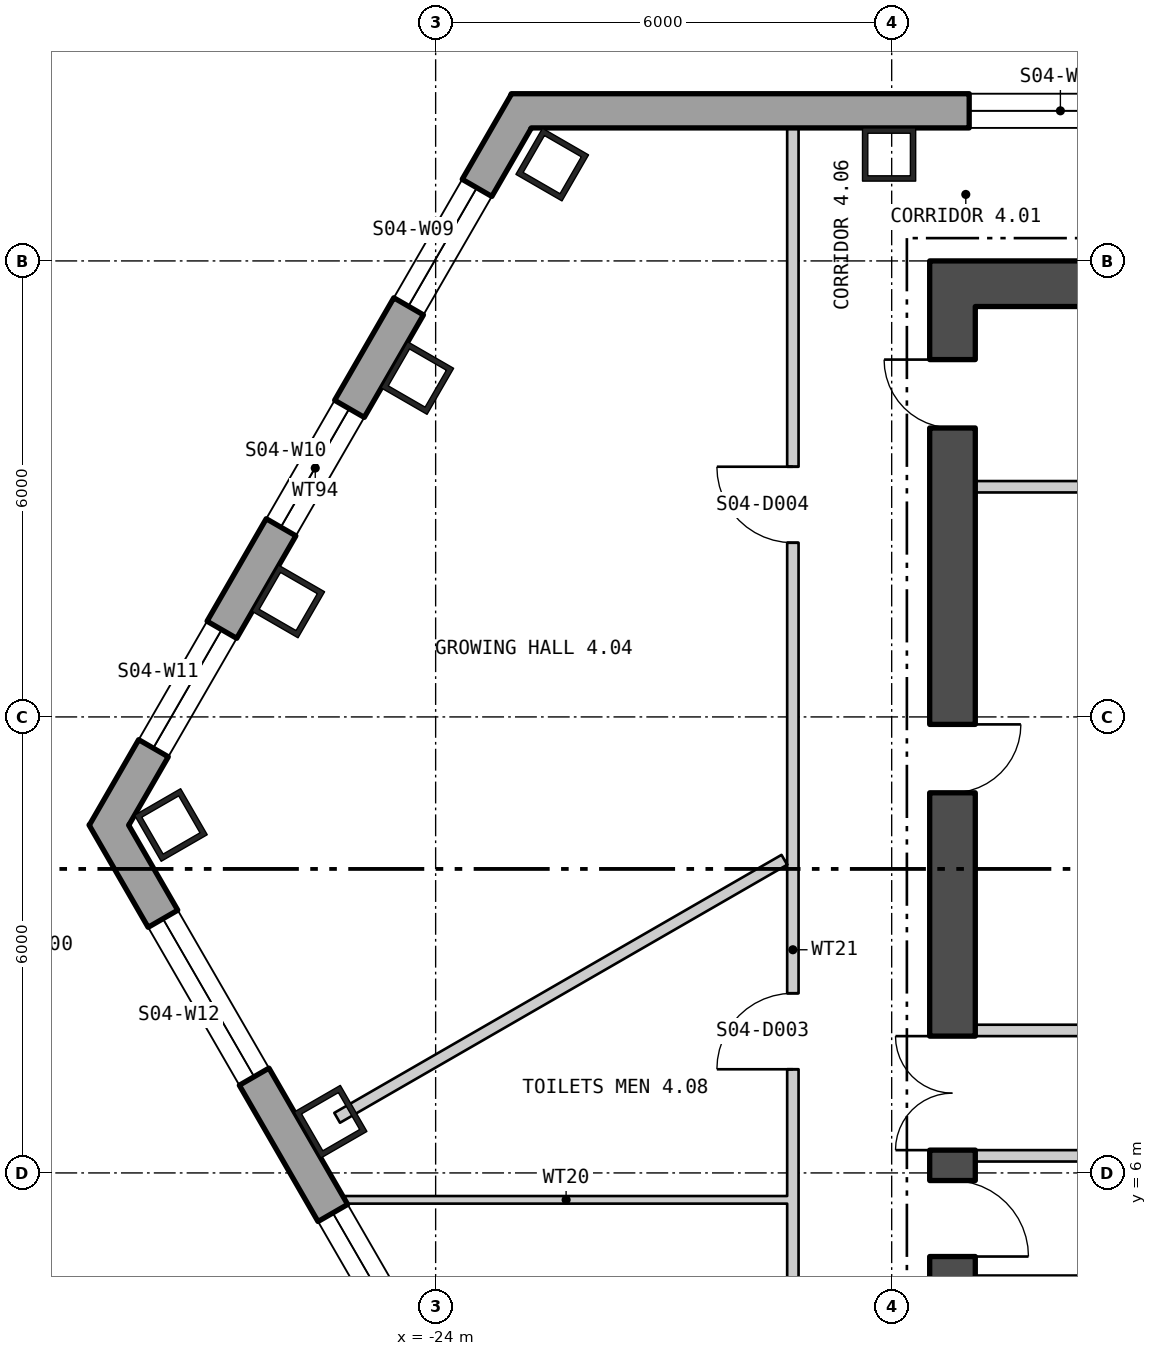
"""IFC4 building model, lengths in metres.
Left out: names, types, materials, properties, quantities, classifications, styles, units other than length and angle.
Written with IfcOpenShell. Run it as: python <this file> out.ifc"""

import sys

from ifc_helpers import new_model, si_unit, direction, frame, frame_2d, origin, origin_2d, place, context, subcontext, project, spatial, polyline, rectangle, hollow_rectangle, outline, extrude, element, fill, save


model = new_model("IFC4")
c1 = context("Model", 3, precision=1e-05, world=origin(), true_north=direction((0.0, 1.0)))
c2 = subcontext(c1, "Body", "Model", "MODEL_VIEW")
j1 = project(units=[si_unit("LENGTHUNIT", "METRE"), si_unit("PLANEANGLEUNIT", "RADIAN")], contexts=[c1])
p1 = place(None, origin())
s1 = spatial("IfcSite", under=j1, at=p1, CompositionType="ELEMENT")
p2 = place(p1, origin())
s2 = spatial("IfcBuilding", under=s1, at=p2, CompositionType="ELEMENT")
p3 = place(p2, frame((0.0, 0.0, 60.3)))
s3 = spatial("IfcBuildingStorey", under=s2, at=p3, CompositionType="ELEMENT", Elevation=60.3)
for number, where, z_axis, x_axis in (
    (1, (-18.034, 19.4, 0.0), (0.0, 0.0, 1.0), (-1.0, 0.0, 0.0)),
    (2, (-22.466, 19.267, 0.0), (0.0, 0.0, 1.0), (-0.5, -0.866, 0.0)),
    (3, (-24.241, 16.459, 0.0), (0.0, 0.0, 1.0), (-0.5, -0.866, 0.0)),
    (4, (-25.939, 13.519, 0.0), (0.0, 0.0, 1.0), (-0.5, -0.866, 0.0)),
    (5, (-27.483, 10.578, 0.0), (0.0, 0.0, 1.0), (0.5, -0.866, 0.0)),
    (6, (-25.382, 6.674, 0.0), (0.0, 0.0, 1.0), (0.5, -0.866, 0.0)),
):
    element("IfcColumn", number, at=place(p3, frame(where, z_axis=z_axis, x_axis=x_axis)), inside=s3, PredefinedType="COLUMN", context=c2, shape_type="SweptSolid", body=[
        extrude(hollow_rectangle(XDim=0.7, YDim=0.7, WallThickness=0.07, at=origin_2d()), origin(), (0.0, 0.0, 1.0), 4.5),
    ])
p4 = place(p3, frame((22.875, 19.975, -0.4), z_axis=(0.0, 0.0, 1.0), x_axis=(-1.0, 0.0, 0.0)))
e7 = element("IfcWall", 7, at=p4, inside=s3, PredefinedType="SOLIDWALL", context=c2, shape_type="SweptSolid", body=[
    extrude(outline(polyline([(-0.13, -0.225), (45.88, -0.225), (45.62, 0.225), (0.13, 0.225), (-0.13, -0.225)])), origin(), (0.0, 0.0, 1.0), 4.5),
])
p5 = place(p4, frame((5.895, 0.0, 1.3)))
e8 = element("IfcOpeningElement", 8, at=p5, cuts=e7, PredefinedType="OPENING", context=c2, shape_type="SweptSolid", body=[
    extrude(rectangle(XDim=2.4, YDim=2.6, at=frame_2d((1.2, 1.3))), frame((0.0, 0.235, 0.0), z_axis=(0.0, -1.0, 0.0), x_axis=(1.0, 0.0, 0.0)), (0.0, 0.0, 1.0), 0.47),
])
p6 = place(p4, frame((10.403, 0.0, 1.3)))
e9 = element("IfcOpeningElement", 9, at=p6, cuts=e7, PredefinedType="OPENING", context=c2, shape_type="SweptSolid", body=[
    extrude(rectangle(XDim=2.4, YDim=2.6, at=frame_2d((1.2, 1.3))), frame((0.0, 0.235, 0.0), z_axis=(0.0, -1.0, 0.0), x_axis=(1.0, 0.0, 0.0)), (0.0, 0.0, 1.0), 0.47),
])
p7 = place(p4, frame((14.912, 0.0, 1.3)))
e10 = element("IfcOpeningElement", 10, at=p7, cuts=e7, PredefinedType="OPENING", context=c2, shape_type="SweptSolid", body=[
    extrude(rectangle(XDim=2.4, YDim=2.6, at=frame_2d((1.2, 1.3))), frame((0.0, 0.235, 0.0), z_axis=(0.0, -1.0, 0.0), x_axis=(1.0, 0.0, 0.0)), (0.0, 0.0, 1.0), 0.47),
])
p8 = place(p4, frame((19.421, 0.0, 1.3)))
e11 = element("IfcOpeningElement", 11, at=p8, cuts=e7, PredefinedType="OPENING", context=c2, shape_type="SweptSolid", body=[
    extrude(rectangle(XDim=2.4, YDim=2.6, at=frame_2d((1.2, 1.3))), frame((0.0, 0.235, 0.0), z_axis=(0.0, -1.0, 0.0), x_axis=(1.0, 0.0, 0.0)), (0.0, 0.0, 1.0), 0.47),
])
p9 = place(p4, frame((23.929, 0.0, 1.3)))
e12 = element("IfcOpeningElement", 12, at=p9, cuts=e7, PredefinedType="OPENING", context=c2, shape_type="SweptSolid", body=[
    extrude(rectangle(XDim=2.4, YDim=2.6, at=frame_2d((1.2, 1.3))), frame((0.0, 0.235, 0.0), z_axis=(0.0, -1.0, 0.0), x_axis=(1.0, 0.0, 0.0)), (0.0, 0.0, 1.0), 0.47),
])
p10 = place(p4, frame((28.438, 0.0, 1.3)))
e13 = element("IfcOpeningElement", 13, at=p10, cuts=e7, PredefinedType="OPENING", context=c2, shape_type="SweptSolid", body=[
    extrude(rectangle(XDim=2.4, YDim=2.6, at=frame_2d((1.2, 1.3))), frame((0.0, 0.235, 0.0), z_axis=(0.0, -1.0, 0.0), x_axis=(1.0, 0.0, 0.0)), (0.0, 0.0, 1.0), 0.47),
])
p11 = place(p4, frame((32.947, 0.0, 1.3)))
e14 = element("IfcOpeningElement", 14, at=p11, cuts=e7, PredefinedType="OPENING", context=c2, shape_type="SweptSolid", body=[
    extrude(rectangle(XDim=2.4, YDim=2.6, at=frame_2d((1.2, 1.3))), frame((0.0, 0.235, 0.0), z_axis=(0.0, -1.0, 0.0), x_axis=(1.0, 0.0, 0.0)), (0.0, 0.0, 1.0), 0.47),
])
p12 = place(p4, frame((37.455, 0.0, 1.3)))
e15 = element("IfcOpeningElement", 15, at=p12, cuts=e7, PredefinedType="OPENING", context=c2, shape_type="SweptSolid", body=[
    extrude(rectangle(XDim=2.4, YDim=2.6, at=frame_2d((1.2, 1.3))), frame((0.0, 0.235, 0.0), z_axis=(0.0, -1.0, 0.0), x_axis=(1.0, 0.0, 0.0)), (0.0, 0.0, 1.0), 0.47),
])
p13 = place(p3, frame((-22.871, 19.973, -0.4), z_axis=(0.0, 0.0, 1.0), x_axis=(-0.500001948972, -0.866024278542, 0.0)))
e16 = element("IfcWall", 16, at=p13, inside=s3, PredefinedType="SOLIDWALL", context=c2, shape_type="SweptSolid", body=[
    extrude(outline(polyline([(-0.13, -0.225), (10.98, -0.225), (10.72, 0.225), (0.13, 0.225), (-0.13, -0.225)])), origin(), (0.0, 0.0, 1.0), 4.5),
])
p14 = place(p13, frame((1.168, 0.0, 1.3)))
e17 = element("IfcOpeningElement", 17, at=p14, cuts=e16, PredefinedType="OPENING", context=c2, shape_type="SweptSolid", body=[
    extrude(rectangle(XDim=1.8, YDim=2.6, at=frame_2d((0.9, 1.3))), frame((0.0, 0.235, 0.0), z_axis=(0.0, -1.0, 0.0), x_axis=(1.0, 0.0, 0.0)), (0.0, 0.0, 1.0), 0.47),
])
p15 = place(p13, frame((4.525, 0.0, 1.3)))
e18 = element("IfcOpeningElement", 18, at=p15, cuts=e16, PredefinedType="OPENING", context=c2, shape_type="SweptSolid", body=[
    extrude(rectangle(XDim=1.8, YDim=2.6, at=frame_2d((0.9, 1.3))), frame((0.0, 0.235, 0.0), z_axis=(0.0, -1.0, 0.0), x_axis=(1.0, 0.0, 0.0)), (0.0, 0.0, 1.0), 0.47),
])
p16 = place(p13, frame((7.882, 0.0, 1.3)))
e19 = element("IfcOpeningElement", 19, at=p16, cuts=e16, PredefinedType="OPENING", context=c2, shape_type="SweptSolid", body=[
    extrude(rectangle(XDim=1.8, YDim=2.6, at=frame_2d((0.9, 1.3))), frame((0.0, 0.235, 0.0), z_axis=(0.0, -1.0, 0.0), x_axis=(1.0, 0.0, 0.0)), (0.0, 0.0, 1.0), 0.47),
])
p17 = place(p3, frame((-28.3, 10.579, -0.18), z_axis=(0.0, 0.0, 1.0), x_axis=(0.499999388847, -0.866025756634, 0.0)))
e20 = element("IfcWall", 20, at=p17, inside=s3, PredefinedType="SOLIDWALL", context=c2, shape_type="SweptSolid", body=[
    extrude(outline(polyline([(-0.13, -0.225), (45.88, -0.225), (45.62, 0.225), (0.13, 0.225), (-0.13, -0.225)])), origin(), (0.0, 0.0, 1.0), 4.28),
])
p18 = place(p17, frame((1.425, 0.0, 1.08)))
e21 = element("IfcOpeningElement", 21, at=p18, cuts=e20, PredefinedType="OPENING", context=c2, shape_type="SweptSolid", body=[
    extrude(rectangle(XDim=2.4, YDim=2.6, at=frame_2d((1.2, 1.3))), frame((0.0, 0.235, 0.0), z_axis=(0.0, -1.0, 0.0), x_axis=(1.0, 0.0, 0.0)), (0.0, 0.0, 1.0), 0.47),
])
p19 = place(p17, frame((5.895, 0.0, 1.08)))
e22 = element("IfcOpeningElement", 22, at=p19, cuts=e20, PredefinedType="OPENING", context=c2, shape_type="SweptSolid", body=[
    extrude(rectangle(XDim=2.4, YDim=2.6, at=frame_2d((1.2, 1.3))), frame((0.0, 0.235, 0.0), z_axis=(0.0, -1.0, 0.0), x_axis=(1.0, 0.0, 0.0)), (0.0, 0.0, 1.0), 0.47),
])
p20 = place(p17, frame((10.403, 0.0, 1.08)))
e23 = element("IfcOpeningElement", 23, at=p20, cuts=e20, PredefinedType="OPENING", context=c2, shape_type="SweptSolid", body=[
    extrude(rectangle(XDim=2.4, YDim=2.6, at=frame_2d((1.2, 1.3))), frame((0.0, 0.235, 0.0), z_axis=(0.0, -1.0, 0.0), x_axis=(1.0, 0.0, 0.0)), (0.0, 0.0, 1.0), 0.47),
])
p21 = place(p17, frame((14.912, 0.0, 1.08)))
e24 = element("IfcOpeningElement", 24, at=p21, cuts=e20, PredefinedType="OPENING", context=c2, shape_type="SweptSolid", body=[
    extrude(rectangle(XDim=2.4, YDim=2.6, at=frame_2d((1.2, 1.3))), frame((0.0, 0.235, 0.0), z_axis=(0.0, -1.0, 0.0), x_axis=(1.0, 0.0, 0.0)), (0.0, 0.0, 1.0), 0.47),
])
p22 = place(p17, frame((19.421, 0.0, 1.08)))
e25 = element("IfcOpeningElement", 25, at=p22, cuts=e20, PredefinedType="OPENING", context=c2, shape_type="SweptSolid", body=[
    extrude(rectangle(XDim=2.4, YDim=2.6, at=frame_2d((1.2, 1.3))), frame((0.0, 0.235, 0.0), z_axis=(0.0, -1.0, 0.0), x_axis=(1.0, 0.0, 0.0)), (0.0, 0.0, 1.0), 0.47),
])
p23 = place(p17, frame((23.929, 0.0, 1.08)))
e26 = element("IfcOpeningElement", 26, at=p23, cuts=e20, PredefinedType="OPENING", context=c2, shape_type="SweptSolid", body=[
    extrude(rectangle(XDim=2.4, YDim=2.6, at=frame_2d((1.2, 1.3))), frame((0.0, 0.235, 0.0), z_axis=(0.0, -1.0, 0.0), x_axis=(1.0, 0.0, 0.0)), (0.0, 0.0, 1.0), 0.47),
])
p24 = place(p17, frame((28.438, 0.0, 1.08)))
e27 = element("IfcOpeningElement", 27, at=p24, cuts=e20, PredefinedType="OPENING", context=c2, shape_type="SweptSolid", body=[
    extrude(rectangle(XDim=2.4, YDim=2.6, at=frame_2d((1.2, 1.3))), frame((0.0, 0.235, 0.0), z_axis=(0.0, -1.0, 0.0), x_axis=(1.0, 0.0, 0.0)), (0.0, 0.0, 1.0), 0.47),
])
p25 = place(p17, frame((32.947, 0.0, 1.08)))
e28 = element("IfcOpeningElement", 28, at=p25, cuts=e20, PredefinedType="OPENING", context=c2, shape_type="SweptSolid", body=[
    extrude(rectangle(XDim=2.4, YDim=2.6, at=frame_2d((1.2, 1.3))), frame((0.0, 0.235, 0.0), z_axis=(0.0, -1.0, 0.0), x_axis=(1.0, 0.0, 0.0)), (0.0, 0.0, 1.0), 0.47),
])
p26 = place(p17, frame((37.455, 0.0, 1.08)))
e29 = element("IfcOpeningElement", 29, at=p26, cuts=e20, PredefinedType="OPENING", context=c2, shape_type="SweptSolid", body=[
    extrude(rectangle(XDim=2.4, YDim=2.6, at=frame_2d((1.2, 1.3))), frame((0.0, 0.235, 0.0), z_axis=(0.0, -1.0, 0.0), x_axis=(1.0, 0.0, 0.0)), (0.0, 0.0, 1.0), 0.47),
])
p27 = place(p17, frame((41.925, 0.0, 1.08)))
e30 = element("IfcOpeningElement", 30, at=p27, cuts=e20, PredefinedType="OPENING", context=c2, shape_type="SweptSolid", body=[
    extrude(rectangle(XDim=2.4, YDim=2.6, at=frame_2d((1.2, 1.3))), frame((0.0, 0.235, 0.0), z_axis=(0.0, -1.0, 0.0), x_axis=(1.0, 0.0, 0.0)), (0.0, 0.0, 1.0), 0.47),
])
p28 = place(p3, frame((-17.5, 17.7, 0.0), z_axis=(0.0, 0.0, 1.0), x_axis=(1.0, 0.0, 0.0)))
e31 = element("IfcWall", 31, at=p28, inside=s3, PredefinedType="SHEAR", context=c2, shape_type="SweptSolid", body=[
    extrude(rectangle(XDim=35.0, YDim=0.6, at=frame_2d((17.5, 0.0))), origin(), (0.0, 0.0, 1.0), 4.3),
])
p29 = place(p3, frame((-17.2, 0.6, 0.0), z_axis=(0.0, 0.0, 1.0), x_axis=(0.0, 1.0, 0.0)))
e32 = element("IfcWall", 32, at=p29, inside=s3, PredefinedType="SHEAR", context=c2, shape_type="SweptSolid", body=[
    extrude(rectangle(XDim=16.8, YDim=0.6, at=frame_2d((8.4, 0.0))), origin(), (0.0, 0.0, 1.0), 4.3),
])
p30 = place(p29, frame((5.7, 0.0, 0.0)))
e33 = element("IfcOpeningElement", 33, at=p30, cuts=e32, PredefinedType="OPENING", context=c2, shape_type="SweptSolid", body=[
    extrude(rectangle(XDim=1.5, YDim=2.1, at=frame_2d((0.75, 1.05))), frame((0.0, 0.31, 0.0), z_axis=(0.0, -1.0, 0.0), x_axis=(1.0, 0.0, 0.0)), (0.0, 0.0, 1.0), 0.62),
])
p31 = place(p29, frame((1.5, 0.0, 0.0)))
e34 = element("IfcOpeningElement", 34, at=p31, cuts=e32, PredefinedType="OPENING", context=c2, shape_type="SweptSolid", body=[
    extrude(rectangle(XDim=0.9, YDim=2.1, at=frame_2d((0.45, 1.05))), frame((0.0, 0.31, 0.0), z_axis=(0.0, -1.0, 0.0), x_axis=(1.0, 0.0, 0.0)), (0.0, 0.0, 1.0), 0.62),
])
p32 = place(p29, frame((4.3, 0.0, 0.0)))
e35 = element("IfcOpeningElement", 35, at=p32, cuts=e32, PredefinedType="OPENING", context=c2, shape_type="SweptSolid", body=[
    extrude(rectangle(XDim=1.0, YDim=2.1, at=frame_2d((0.5, 1.05))), frame((0.0, 0.31, 0.0), z_axis=(0.0, -1.0, 0.0), x_axis=(1.0, 0.0, 0.0)), (0.0, 0.0, 1.0), 0.62),
])
p33 = place(p29, frame((10.402, 0.0, 0.0)))
e36 = element("IfcOpeningElement", 36, at=p33, cuts=e32, PredefinedType="OPENING", context=c2, shape_type="SweptSolid", body=[
    extrude(rectangle(XDim=0.9, YDim=2.1, at=frame_2d((0.45, 1.05))), frame((0.0, 0.31, 0.0), z_axis=(0.0, -1.0, 0.0), x_axis=(1.0, 0.0, 0.0)), (0.0, 0.0, 1.0), 0.62),
])
p34 = place(p29, frame((15.202, 0.0, 0.0)))
e37 = element("IfcOpeningElement", 37, at=p34, cuts=e32, PredefinedType="OPENING", context=c2, shape_type="SweptSolid", body=[
    extrude(rectangle(XDim=0.9, YDim=2.1, at=frame_2d((0.45, 1.05))), frame((0.0, 0.31, 0.0), z_axis=(0.0, -1.0, 0.0), x_axis=(1.0, 0.0, 0.0)), (0.0, 0.0, 1.0), 0.62),
])
for number, where, z_axis, x_axis in (
    (38, (-16.9, 6.225, 0.0), (0.0, 0.0, 1.0), (1.0, 0.0, 0.0)),
    (39, (-16.9, 7.875, 0.0), (0.0, 0.0, 1.0), (1.0, 0.0, 0.0)),
    (40, (-16.9, 4.575, 0.0), (0.0, 0.0, 1.0), (1.0, 0.0, 0.0)),
    (41, (-16.9, 15.028, 0.0), (0.0, 0.0, 1.0), (1.0, 0.0, 0.0)),
):
    element("IfcWall", number, at=place(p3, frame(where, z_axis=z_axis, x_axis=x_axis)), inside=s3, PredefinedType="PARTITIONING", context=c2, shape_type="SweptSolid", body=[
        extrude(rectangle(XDim=2.4, YDim=0.15, at=frame_2d((1.2, 0.0))), origin(), (0.0, 0.0, 1.0), 4.3),
    ])
p35 = place(p3, frame((-25.296, 6.725, 0.0), z_axis=(0.0, 0.0, 1.0), x_axis=(0.866161077876, 0.499764931915, 0.0)))
e42 = element("IfcWall", 42, at=p35, inside=s3, PredefinedType="PARTITIONING", context=c2, shape_type="SweptSolid", body=[
    extrude(rectangle(XDim=6.793, YDim=0.15, at=frame_2d((3.397, 0.0))), origin(), (0.0, 0.0, 1.0), 4.3),
])
p36 = place(p3, frame((-25.192, 5.646, 0.0), z_axis=(0.0, 0.0, 1.0), x_axis=(1.0, 0.0, 0.0)))
e43 = element("IfcWall", 43, at=p36, inside=s3, PredefinedType="PARTITIONING", context=c2, shape_type="SweptSolid", body=[
    extrude(rectangle(XDim=5.817, YDim=0.1, at=frame_2d((2.909, 0.0))), origin(), (0.0, 0.0, 1.0), 4.3),
])
p37 = place(p3, frame((-19.3, -1.875, 0.0), z_axis=(0.0, 0.0, 1.0), x_axis=(0.0, 1.0, 0.0)))
e44 = element("IfcWall", 44, at=p37, inside=s3, PredefinedType="PARTITIONING", context=c2, shape_type="SweptSolid", body=[
    extrude(rectangle(XDim=21.623, YDim=0.15, at=frame_2d((10.812, 0.0))), origin(), (0.0, 0.0, 1.0), 4.3),
])
p38 = place(p37, frame((2.839, 0.0, 0.0)))
e45 = element("IfcOpeningElement", 45, at=p38, cuts=e44, PredefinedType="OPENING", context=c2, shape_type="SweptSolid", body=[
    extrude(rectangle(XDim=1.0, YDim=2.1, at=frame_2d((0.5, 1.05))), frame((0.0, 0.085, 0.0), z_axis=(0.0, -1.0, 0.0), x_axis=(1.0, 0.0, 0.0)), (0.0, 0.0, 1.0), 0.17),
])
p39 = place(p37, frame((5.28, 0.0, 0.0)))
e46 = element("IfcOpeningElement", 46, at=p39, cuts=e44, PredefinedType="OPENING", context=c2, shape_type="SweptSolid", body=[
    extrude(rectangle(XDim=1.0, YDim=2.1, at=frame_2d((0.5, 1.05))), frame((0.0, 0.085, 0.0), z_axis=(0.0, -1.0, 0.0), x_axis=(1.0, 0.0, 0.0)), (0.0, 0.0, 1.0), 0.17),
])
p40 = place(p37, frame((9.239, 0.0, 0.0)))
e47 = element("IfcOpeningElement", 47, at=p40, cuts=e44, PredefinedType="OPENING", context=c2, shape_type="SweptSolid", body=[
    extrude(rectangle(XDim=1.0, YDim=2.1, at=frame_2d((0.5, 1.05))), frame((0.0, 0.085, 0.0), z_axis=(0.0, -1.0, 0.0), x_axis=(1.0, 0.0, 0.0)), (0.0, 0.0, 1.0), 0.17),
])
p41 = place(p37, frame((16.167, 0.0, 0.0)))
e48 = element("IfcOpeningElement", 48, at=p41, cuts=e44, PredefinedType="OPENING", context=c2, shape_type="SweptSolid", body=[
    extrude(rectangle(XDim=1.0, YDim=2.1, at=frame_2d((0.5, 1.05))), frame((0.0, 0.085, 0.0), z_axis=(0.0, -1.0, 0.0), x_axis=(1.0, 0.0, 0.0)), (0.0, 0.0, 1.0), 0.17),
])
p42 = place(p12, origin())
e49 = element("IfcWindow", 49, at=p42, inside=s3, PartitioningType="SINGLE_PANEL", PredefinedType="WINDOW", context=c2, shape_type="SweptSolid", body=[
    extrude(rectangle(XDim=2.4, YDim=2.6, at=frame_2d((1.2, 1.3))), frame((0.0, 0.105, 0.0), z_axis=(0.0, -1.0, 0.0), x_axis=(1.0, 0.0, 0.0)), (0.0, 0.0, 1.0), 0.06),
])
fill(e15, e49)
p43 = place(p14, origin())
e50 = element("IfcWindow", 50, at=p43, inside=s3, PartitioningType="SINGLE_PANEL", PredefinedType="WINDOW", context=c2, shape_type="SweptSolid", body=[
    extrude(rectangle(XDim=1.8, YDim=2.6, at=frame_2d((0.9, 1.3))), frame((0.0, 0.105, 0.0), z_axis=(0.0, -1.0, 0.0), x_axis=(1.0, 0.0, 0.0)), (0.0, 0.0, 1.0), 0.06),
])
fill(e17, e50)
p44 = place(p15, origin())
e51 = element("IfcWindow", 51, at=p44, inside=s3, PartitioningType="SINGLE_PANEL", PredefinedType="WINDOW", context=c2, shape_type="SweptSolid", body=[
    extrude(rectangle(XDim=1.8, YDim=2.6, at=frame_2d((0.9, 1.3))), frame((0.0, 0.105, 0.0), z_axis=(0.0, -1.0, 0.0), x_axis=(1.0, 0.0, 0.0)), (0.0, 0.0, 1.0), 0.06),
])
fill(e18, e51)
p45 = place(p16, origin())
e52 = element("IfcWindow", 52, at=p45, inside=s3, PartitioningType="SINGLE_PANEL", PredefinedType="WINDOW", context=c2, shape_type="SweptSolid", body=[
    extrude(rectangle(XDim=1.8, YDim=2.6, at=frame_2d((0.9, 1.3))), frame((0.0, 0.105, 0.0), z_axis=(0.0, -1.0, 0.0), x_axis=(1.0, 0.0, 0.0)), (0.0, 0.0, 1.0), 0.06),
])
fill(e19, e52)
p46 = place(p18, origin())
e53 = element("IfcWindow", 53, at=p46, inside=s3, PartitioningType="SINGLE_PANEL", PredefinedType="WINDOW", context=c2, shape_type="SweptSolid", body=[
    extrude(rectangle(XDim=2.4, YDim=2.6, at=frame_2d((1.2, 1.3))), frame((0.0, 0.105, 0.0), z_axis=(0.0, -1.0, 0.0), x_axis=(1.0, 0.0, 0.0)), (0.0, 0.0, 1.0), 0.06),
])
fill(e21, e53)
p47 = place(p19, origin())
e54 = element("IfcWindow", 54, at=p47, inside=s3, PartitioningType="SINGLE_PANEL", PredefinedType="WINDOW", context=c2, shape_type="SweptSolid", body=[
    extrude(rectangle(XDim=2.4, YDim=2.6, at=frame_2d((1.2, 1.3))), frame((0.0, 0.105, 0.0), z_axis=(0.0, -1.0, 0.0), x_axis=(1.0, 0.0, 0.0)), (0.0, 0.0, 1.0), 0.06),
])
fill(e22, e54)
p48 = place(p30, origin())
e55 = element("IfcDoor", 55, at=p48, inside=s3, OperationType="DOUBLE_DOOR_SINGLE_SWING", PredefinedType="DOOR", context=c2, shape_type="SweptSolid", body=[
    extrude(rectangle(XDim=1.5, YDim=2.1, at=frame_2d((0.75, 1.05))), frame((0.0, 0.025, 0.0), z_axis=(0.0, -1.0, 0.0), x_axis=(1.0, 0.0, 0.0)), (0.0, 0.0, 1.0), 0.05),
])
fill(e33, e55)
p49 = place(p32, origin())
e56 = element("IfcDoor", 56, at=p49, inside=s3, OperationType="SINGLE_SWING_LEFT", PredefinedType="DOOR", context=c2, shape_type="SweptSolid", body=[
    extrude(rectangle(XDim=1.0, YDim=2.1, at=frame_2d((0.5, 1.05))), frame((0.0, 0.025, 0.0), z_axis=(0.0, -1.0, 0.0), x_axis=(1.0, 0.0, 0.0)), (0.0, 0.0, 1.0), 0.05),
])
fill(e35, e56)
p50 = place(p33, origin())
e57 = element("IfcDoor", 57, at=p50, inside=s3, OperationType="SINGLE_SWING_RIGHT", PredefinedType="DOOR", context=c2, shape_type="SweptSolid", body=[
    extrude(rectangle(XDim=0.9, YDim=2.1, at=frame_2d((0.45, 1.05))), frame((0.0, 0.025, 0.0), z_axis=(0.0, -1.0, 0.0), x_axis=(1.0, 0.0, 0.0)), (0.0, 0.0, 1.0), 0.05),
])
fill(e36, e57)
p51 = place(p34, origin())
e58 = element("IfcDoor", 58, at=p51, inside=s3, OperationType="SINGLE_SWING_LEFT", PredefinedType="DOOR", context=c2, shape_type="SweptSolid", body=[
    extrude(rectangle(XDim=0.9, YDim=2.1, at=frame_2d((0.45, 1.05))), frame((0.0, 0.025, 0.0), z_axis=(0.0, -1.0, 0.0), x_axis=(1.0, 0.0, 0.0)), (0.0, 0.0, 1.0), 0.05),
])
fill(e37, e58)
p52 = place(p40, origin())
e59 = element("IfcDoor", 59, at=p52, inside=s3, OperationType="SINGLE_SWING_RIGHT", PredefinedType="DOOR", context=c2, shape_type="SweptSolid", body=[
    extrude(rectangle(XDim=1.0, YDim=2.1, at=frame_2d((0.5, 1.05))), frame((0.0, 0.025, 0.0), z_axis=(0.0, -1.0, 0.0), x_axis=(1.0, 0.0, 0.0)), (0.0, 0.0, 1.0), 0.05),
])
fill(e47, e59)
p53 = place(p41, origin())
e60 = element("IfcDoor", 60, at=p53, inside=s3, OperationType="SINGLE_SWING_LEFT", PredefinedType="DOOR", context=c2, shape_type="SweptSolid", body=[
    extrude(rectangle(XDim=1.0, YDim=2.1, at=frame_2d((0.5, 1.05))), frame((0.0, 0.025, 0.0), z_axis=(0.0, -1.0, 0.0), x_axis=(1.0, 0.0, 0.0)), (0.0, 0.0, 1.0), 0.05),
])
fill(e48, e60)
save(model, sys.argv[1])
